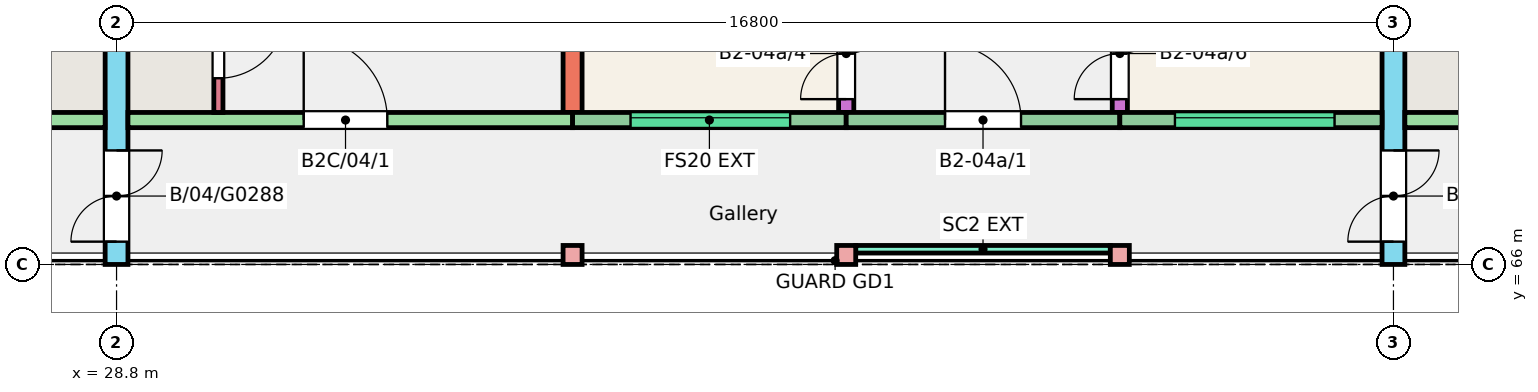
"""IFC4 building model, lengths in metres.
Left out: names, types, materials, properties, quantities, classifications, styles, units other than length and angle.
Written with IfcOpenShell. Run it as: python <this file> out.ifc"""

import sys

from ifc_helpers import new_model, si_unit, direction, frame, frame_2d, origin, origin_2d, place, context, subcontext, project, spatial, rectangle, extrude, element, fill, save


model = new_model("IFC4")
c1 = context("Model", 3, precision=1e-05, world=origin(), true_north=direction((0.0, 1.0)))
c2 = subcontext(c1, "Body", "Model", "MODEL_VIEW")
j1 = project(units=[si_unit("LENGTHUNIT", "METRE"), si_unit("PLANEANGLEUNIT", "RADIAN")], contexts=[c1])
p1 = place(None, origin())
s1 = spatial("IfcSite", under=j1, at=p1, CompositionType="ELEMENT")
p2 = place(p1, origin())
s2 = spatial("IfcBuilding", under=s1, at=p2, CompositionType="ELEMENT")
p3 = place(p2, frame((0.0, 0.0, 12.0)))
s3 = spatial("IfcBuildingStorey", under=s2, at=p3, CompositionType="ELEMENT", Elevation=12.0)
p4 = place(p3, frame((28.8, 66.0, 0.0), z_axis=(0.0, 0.0, 1.0), x_axis=(0.0, 1.0, 0.0)))
e1 = element("IfcWall", 1, at=p4, inside=s3, PredefinedType="SHEAR", context=c2, shape_type="SweptSolid", body=[
    extrude(rectangle(XDim=11.0, YDim=0.3, at=frame_2d((5.5, 0.0))), origin(), (0.0, 0.0, 1.0), 3.0),
])
p5 = place(p4, frame((0.3, 0.0, 0.0)))
e2 = element("IfcOpeningElement", 2, at=p5, cuts=e1, PredefinedType="OPENING", context=c2, shape_type="SweptSolid", body=[
    extrude(rectangle(XDim=1.2, YDim=2.1, at=frame_2d((0.6, 1.05))), frame((0.0, 0.16, 0.0), z_axis=(0.0, -1.0, 0.0), x_axis=(1.0, 0.0, 0.0)), (0.0, 0.0, 1.0), 0.32),
])
p6 = place(p3, frame((34.8, 68.0, 0.0), z_axis=(0.0, 0.0, 1.0), x_axis=(0.0, 1.0, 0.0)))
e3 = element("IfcWall", 3, at=p6, inside=s3, PredefinedType="SHEAR", context=c2, shape_type="SweptSolid", body=[
    extrude(rectangle(XDim=9.0, YDim=0.25, at=frame_2d((4.5, 0.0))), origin(), (0.0, 0.0, 1.0), 3.0),
])
p7 = place(p3, frame((38.4, 68.0, 0.0), z_axis=(0.0, 0.0, 1.0), x_axis=(0.0, 1.0, 0.0)))
e4 = element("IfcWall", 4, at=p7, inside=s3, PredefinedType="SHEAR", context=c2, shape_type="SweptSolid", body=[
    extrude(rectangle(XDim=9.0, YDim=0.2, at=frame_2d((4.5, 0.0))), origin(), (0.0, 0.0, 1.0), 3.0),
])
p8 = place(p7, frame((0.175, 0.0, 0.0)))
e5 = element("IfcOpeningElement", 5, at=p8, cuts=e4, PredefinedType="OPENING", context=c2, shape_type="SweptSolid", body=[
    extrude(rectangle(XDim=1.2, YDim=2.1, at=frame_2d((0.6, 1.05))), frame((0.0, 0.11, 0.0), z_axis=(0.0, -1.0, 0.0), x_axis=(1.0, 0.0, 0.0)), (0.0, 0.0, 1.0), 0.22),
])
p9 = place(p7, frame((6.4, 0.0, 0.0)))
e6 = element("IfcOpeningElement", 6, at=p9, cuts=e4, PredefinedType="OPENING", context=c2, shape_type="SweptSolid", body=[
    extrude(rectangle(XDim=1.2, YDim=2.1, at=frame_2d((0.6, 1.05))), frame((0.0, 0.11, 0.0), z_axis=(0.0, -1.0, 0.0), x_axis=(1.0, 0.0, 0.0)), (0.0, 0.0, 1.0), 0.22),
])
p10 = place(p3, frame((42.0, 68.0, 0.0), z_axis=(0.0, 0.0, 1.0), x_axis=(0.0, 1.0, 0.0)))
e7 = element("IfcWall", 7, at=p10, inside=s3, PredefinedType="SHEAR", context=c2, shape_type="SweptSolid", body=[
    extrude(rectangle(XDim=9.0, YDim=0.2, at=frame_2d((4.5, 0.0))), origin(), (0.0, 0.0, 1.0), 3.0),
])
p11 = place(p10, frame((0.175, 0.0, 0.0)))
e8 = element("IfcOpeningElement", 8, at=p11, cuts=e7, PredefinedType="OPENING", context=c2, shape_type="SweptSolid", body=[
    extrude(rectangle(XDim=1.2, YDim=2.1, at=frame_2d((0.6, 1.05))), frame((0.0, 0.11, 0.0), z_axis=(0.0, -1.0, 0.0), x_axis=(1.0, 0.0, 0.0)), (0.0, 0.0, 1.0), 0.22),
])
p12 = place(p10, frame((6.4, 0.0, 0.0)))
e9 = element("IfcOpeningElement", 9, at=p12, cuts=e7, PredefinedType="OPENING", context=c2, shape_type="SweptSolid", body=[
    extrude(rectangle(XDim=1.2, YDim=2.1, at=frame_2d((0.6, 1.05))), frame((0.0, 0.11, 0.0), z_axis=(0.0, -1.0, 0.0), x_axis=(1.0, 0.0, 0.0)), (0.0, 0.0, 1.0), 0.22),
])
p13 = place(p3, frame((45.6, 66.0, 0.0), z_axis=(0.0, 0.0, 1.0), x_axis=(0.0, 1.0, 0.0)))
e10 = element("IfcWall", 10, at=p13, inside=s3, PredefinedType="SHEAR", context=c2, shape_type="SweptSolid", body=[
    extrude(rectangle(XDim=11.0, YDim=0.3, at=frame_2d((5.5, 0.0))), origin(), (0.0, 0.0, 1.0), 3.0),
])
p14 = place(p13, frame((0.3, 0.0, 0.0)))
e11 = element("IfcOpeningElement", 11, at=p14, cuts=e10, PredefinedType="OPENING", context=c2, shape_type="SweptSolid", body=[
    extrude(rectangle(XDim=1.2, YDim=2.1, at=frame_2d((0.6, 1.05))), frame((0.0, 0.16, 0.0), z_axis=(0.0, -1.0, 0.0), x_axis=(1.0, 0.0, 0.0)), (0.0, 0.0, 1.0), 0.32),
])
p15 = place(p3, frame((22.8, 67.9, 0.0), z_axis=(0.0, 0.0, 1.0), x_axis=(1.0, 0.0, 0.0)))
e12 = element("IfcWall", 12, at=p15, inside=s3, PredefinedType="SHEAR", context=c2, shape_type="SweptSolid", body=[
    extrude(rectangle(XDim=5.85, YDim=0.2, at=frame_2d((2.925, 0.0))), origin(), (0.0, 0.0, 1.0), 3.0),
])
p16 = place(p15, frame((2.438, 0.0, 0.0)))
e13 = element("IfcOpeningElement", 13, at=p16, cuts=e12, PredefinedType="OPENING", context=c2, shape_type="SweptSolid", body=[
    extrude(rectangle(XDim=1.1, YDim=2.1, at=frame_2d((0.55, 1.05))), frame((0.0, 0.11, 0.0), z_axis=(0.0, -1.0, 0.0), x_axis=(1.0, 0.0, 0.0)), (0.0, 0.0, 1.0), 0.22),
])
p17 = place(p3, frame((28.95, 67.9, 0.0), z_axis=(0.0, 0.0, 1.0), x_axis=(1.0, 0.0, 0.0)))
e14 = element("IfcWall", 14, at=p17, inside=s3, PredefinedType="SHEAR", context=c2, shape_type="SweptSolid", body=[
    extrude(rectangle(XDim=5.85, YDim=0.2, at=frame_2d((2.925, 0.0))), origin(), (0.0, 0.0, 1.0), 3.0),
])
p18 = place(p17, frame((2.312, 0.0, 0.0)))
e15 = element("IfcOpeningElement", 15, at=p18, cuts=e14, PredefinedType="OPENING", context=c2, shape_type="SweptSolid", body=[
    extrude(rectangle(XDim=1.1, YDim=2.1, at=frame_2d((0.55, 1.05))), frame((0.0, 0.11, 0.0), z_axis=(0.0, -1.0, 0.0), x_axis=(1.0, 0.0, 0.0)), (0.0, 0.0, 1.0), 0.22),
])
p19 = place(p3, frame((30.14, 68.0, 0.0), z_axis=(0.0, 0.0, 1.0), x_axis=(0.0, 1.0, 0.0)))
e16 = element("IfcWall", 16, at=p19, inside=s3, PredefinedType="SHEAR", context=c2, shape_type="SweptSolid", body=[
    extrude(rectangle(XDim=1.72, YDim=0.12, at=frame_2d((0.86, 0.0))), origin(), (0.0, 0.0, 1.0), 3.0),
])
p20 = place(p19, frame((0.45, 0.0, 0.0)))
e17 = element("IfcOpeningElement", 17, at=p20, cuts=e16, PredefinedType="OPENING", context=c2, shape_type="SweptSolid", body=[
    extrude(rectangle(XDim=0.9, YDim=2.1, at=frame_2d((0.45, 1.05))), frame((0.0, 0.07, 0.0), z_axis=(0.0, -1.0, 0.0), x_axis=(1.0, 0.0, 0.0)), (0.0, 0.0, 1.0), 0.14),
])
p21 = place(p3, frame((34.8, 67.9, 0.0), z_axis=(0.0, 0.0, 1.0), x_axis=(1.0, 0.0, 0.0)))
e18 = element("IfcWall", 18, at=p21, inside=s3, PredefinedType="SOLIDWALL", context=c2, shape_type="SweptSolid", body=[
    extrude(rectangle(XDim=3.6, YDim=0.2, at=frame_2d((1.8, 0.0))), origin(), (0.0, 0.0, 1.0), 3.0),
])
p22 = place(p21, frame((0.762, 0.0, 1.2)))
e19 = element("IfcOpeningElement", 19, at=p22, cuts=e18, PredefinedType="OPENING", context=c2, shape_type="SweptSolid", body=[
    extrude(rectangle(XDim=2.1, YDim=1.2, at=frame_2d((1.05, 0.6))), frame((0.0, 0.11, 0.0), z_axis=(0.0, -1.0, 0.0), x_axis=(1.0, 0.0, 0.0)), (0.0, 0.0, 1.0), 0.22),
])
p23 = place(p3, frame((38.4, 67.9, 0.0), z_axis=(0.0, 0.0, 1.0), x_axis=(1.0, 0.0, 0.0)))
e20 = element("IfcWall", 20, at=p23, inside=s3, PredefinedType="SOLIDWALL", context=c2, shape_type="SweptSolid", body=[
    extrude(rectangle(XDim=3.6, YDim=0.2, at=frame_2d((1.8, 0.0))), origin(), (0.0, 0.0, 1.0), 3.0),
])
p24 = place(p23, frame((1.3, 0.0, 0.0)))
e21 = element("IfcOpeningElement", 21, at=p24, cuts=e20, PredefinedType="OPENING", context=c2, shape_type="SweptSolid", body=[
    extrude(rectangle(XDim=1.0, YDim=2.1, at=frame_2d((0.5, 1.05))), frame((0.0, 0.11, 0.0), z_axis=(0.0, -1.0, 0.0), x_axis=(1.0, 0.0, 0.0)), (0.0, 0.0, 1.0), 0.22),
])
p25 = place(p3, frame((42.0, 67.9, 0.0), z_axis=(0.0, 0.0, 1.0), x_axis=(1.0, 0.0, 0.0)))
e22 = element("IfcWall", 22, at=p25, inside=s3, PredefinedType="SOLIDWALL", context=c2, shape_type="SweptSolid", body=[
    extrude(rectangle(XDim=3.45, YDim=0.2, at=frame_2d((1.725, 0.0))), origin(), (0.0, 0.0, 1.0), 3.0),
])
p26 = place(p25, frame((0.725, 0.0, 1.2)))
e23 = element("IfcOpeningElement", 23, at=p26, cuts=e22, PredefinedType="OPENING", context=c2, shape_type="SweptSolid", body=[
    extrude(rectangle(XDim=2.1, YDim=1.2, at=frame_2d((1.05, 0.6))), frame((0.0, 0.11, 0.0), z_axis=(0.0, -1.0, 0.0), x_axis=(1.0, 0.0, 0.0)), (0.0, 0.0, 1.0), 0.22),
])
p27 = place(p3, frame((45.75, 67.9, 0.0), z_axis=(0.0, 0.0, 1.0), x_axis=(1.0, 0.0, 0.0)))
e24 = element("IfcWall", 24, at=p27, inside=s3, PredefinedType="SHEAR", context=c2, shape_type="SweptSolid", body=[
    extrude(rectangle(XDim=5.85, YDim=0.2, at=frame_2d((2.925, 0.0))), origin(), (0.0, 0.0, 1.0), 3.0),
])
p28 = place(p27, frame((2.312, 0.0, 0.0)))
e25 = element("IfcOpeningElement", 25, at=p28, cuts=e24, PredefinedType="OPENING", context=c2, shape_type="SweptSolid", body=[
    extrude(rectangle(XDim=1.1, YDim=2.1, at=frame_2d((0.55, 1.05))), frame((0.0, 0.11, 0.0), z_axis=(0.0, -1.0, 0.0), x_axis=(1.0, 0.0, 0.0)), (0.0, 0.0, 1.0), 0.22),
])
for number, where, z_axis, x_axis in (
    (26, (34.8, 66.125, 0.0), (0.0, 0.0, 1.0), (1.0, 0.0, 0.0)),
    (27, (38.4, 66.125, 0.0), (0.0, 0.0, 1.0), (1.0, 0.0, 0.0)),
    (28, (42.0, 66.125, 0.0), (0.0, 0.0, 1.0), (1.0, 0.0, 0.0)),
):
    element("IfcColumn", number, at=place(p3, frame(where, z_axis=z_axis, x_axis=x_axis)), inside=s3, PredefinedType="COLUMN", context=c2, shape_type="SweptSolid", body=[
        extrude(rectangle(XDim=0.25, YDim=0.25, at=origin_2d()), origin(), (0.0, 0.0, 1.0), 3.0),
    ])
p29 = place(p3, frame((38.525, 66.2, 0.0), z_axis=(0.0, 0.0, 1.0), x_axis=(1.0, 0.0, 0.0)))
e29 = element("IfcWall", 29, at=p29, inside=s3, PredefinedType="SOLIDWALL", context=c2, shape_type="SweptSolid", body=[
    extrude(rectangle(XDim=3.35, YDim=0.1, at=frame_2d((1.675, 0.0))), origin(), (0.0, 0.0, 1.0), 2.45),
])
p30 = place(p22, origin())
e30 = element("IfcWindow", 30, at=p30, inside=s3, PartitioningType="SINGLE_PANEL", PredefinedType="WINDOW", context=c2, shape_type="SweptSolid", body=[
    extrude(rectangle(XDim=2.1, YDim=1.2, at=frame_2d((1.05, 0.6))), frame((0.0, 0.06, 0.0), z_axis=(0.0, -1.0, 0.0), x_axis=(1.0, 0.0, 0.0)), (0.0, 0.0, 1.0), 0.06),
])
fill(e19, e30)
p31 = place(p26, origin())
e31 = element("IfcWindow", 31, at=p31, inside=s3, PartitioningType="SINGLE_PANEL", PredefinedType="WINDOW", context=c2, shape_type="SweptSolid", body=[
    extrude(rectangle(XDim=2.1, YDim=1.2, at=frame_2d((1.05, 0.6))), frame((0.0, 0.06, 0.0), z_axis=(0.0, -1.0, 0.0), x_axis=(1.0, 0.0, 0.0)), (0.0, 0.0, 1.0), 0.06),
])
fill(e23, e31)
p32 = place(p24, origin())
e32 = element("IfcDoor", 32, at=p32, inside=s3, OperationType="SINGLE_SWING_LEFT", PredefinedType="DOOR", context=c2, shape_type="SweptSolid", body=[
    extrude(rectangle(XDim=1.0, YDim=2.1, at=frame_2d((0.5, 1.05))), frame((0.0, 0.025, 0.0), z_axis=(0.0, -1.0, 0.0), x_axis=(1.0, 0.0, 0.0)), (0.0, 0.0, 1.0), 0.05),
])
fill(e21, e32)
p33 = place(p8, origin())
e33 = element("IfcDoor", 33, at=p33, inside=s3, OperationType="DOUBLE_DOOR_SINGLE_SWING", PredefinedType="DOOR", context=c2, shape_type="SweptSolid", body=[
    extrude(rectangle(XDim=1.2, YDim=2.1, at=frame_2d((0.6, 1.05))), frame((0.0, 0.025, 0.0), z_axis=(0.0, -1.0, 0.0), x_axis=(1.0, 0.0, 0.0)), (0.0, 0.0, 1.0), 0.05),
])
fill(e5, e33)
p34 = place(p11, origin())
e34 = element("IfcDoor", 34, at=p34, inside=s3, OperationType="DOUBLE_DOOR_SINGLE_SWING", PredefinedType="DOOR", context=c2, shape_type="SweptSolid", body=[
    extrude(rectangle(XDim=1.2, YDim=2.1, at=frame_2d((0.6, 1.05))), frame((0.0, 0.025, 0.0), z_axis=(0.0, -1.0, 0.0), x_axis=(1.0, 0.0, 0.0)), (0.0, 0.0, 1.0), 0.05),
])
fill(e8, e34)
p35 = place(p18, origin())
e35 = element("IfcDoor", 35, at=p35, inside=s3, OperationType="SINGLE_SWING_LEFT", PredefinedType="DOOR", context=c2, shape_type="SweptSolid", body=[
    extrude(rectangle(XDim=1.1, YDim=2.1, at=frame_2d((0.55, 1.05))), frame((0.0, 0.025, 0.0), z_axis=(0.0, -1.0, 0.0), x_axis=(1.0, 0.0, 0.0)), (0.0, 0.0, 1.0), 0.05),
])
fill(e15, e35)
p36 = place(p20, origin())
e36 = element("IfcDoor", 36, at=p36, inside=s3, OperationType="SINGLE_SWING_RIGHT", PredefinedType="DOOR", context=c2, shape_type="SweptSolid", body=[
    extrude(rectangle(XDim=0.9, YDim=2.1, at=frame_2d((0.45, 1.05))), frame((0.0, 0.025, 0.0), z_axis=(0.0, -1.0, 0.0), x_axis=(1.0, 0.0, 0.0)), (0.0, 0.0, 1.0), 0.05),
])
fill(e17, e36)
p37 = place(p5, origin())
e37 = element("IfcDoor", 37, at=p37, inside=s3, OperationType="DOUBLE_DOOR_SINGLE_SWING", PredefinedType="DOOR", context=c2, shape_type="SweptSolid", body=[
    extrude(rectangle(XDim=1.2, YDim=2.1, at=frame_2d((0.6, 1.05))), frame((0.0, 0.025, 0.0), z_axis=(0.0, -1.0, 0.0), x_axis=(1.0, 0.0, 0.0)), (0.0, 0.0, 1.0), 0.05),
])
fill(e2, e37)
p38 = place(p14, origin())
e38 = element("IfcDoor", 38, at=p38, inside=s3, OperationType="DOUBLE_DOOR_SINGLE_SWING", PredefinedType="DOOR", context=c2, shape_type="SweptSolid", body=[
    extrude(rectangle(XDim=1.2, YDim=2.1, at=frame_2d((0.6, 1.05))), frame((0.0, 0.025, 0.0), z_axis=(0.0, -1.0, 0.0), x_axis=(1.0, 0.0, 0.0)), (0.0, 0.0, 1.0), 0.05),
])
fill(e11, e38)
save(model, sys.argv[1])
